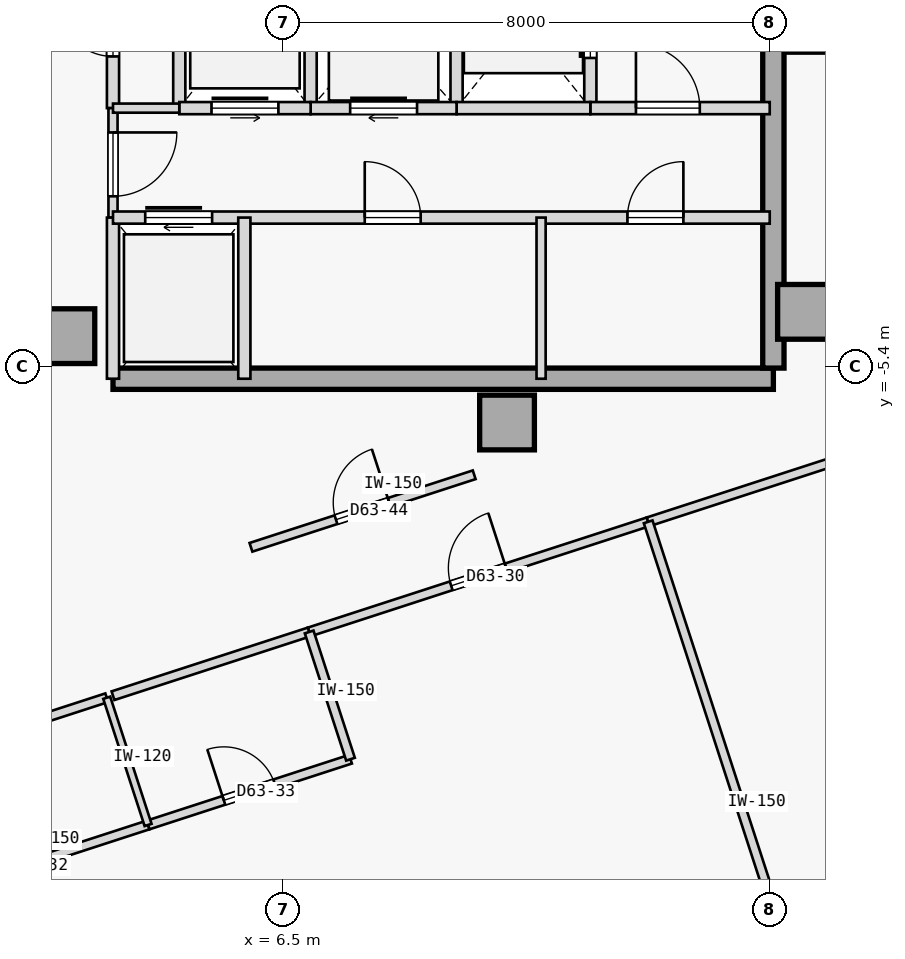
"""IFC4 building model, lengths in metres.
Left out: names, types, materials, properties, quantities, classifications, styles, units other than length and angle.
Written with IfcOpenShell. Run it as: python <this file> out.ifc"""

import sys

from ifc_helpers import new_model, si_unit, direction, frame, frame_2d, origin, origin_2d, place, context, subcontext, project, spatial, rectangle, extrude, element, fill, save


model = new_model("IFC4")
c1 = context("Model", 3, precision=1e-05, world=origin(), true_north=direction((0.0, 1.0)))
c2 = subcontext(c1, "Body", "Model", "MODEL_VIEW")
j1 = project(units=[si_unit("LENGTHUNIT", "METRE"), si_unit("PLANEANGLEUNIT", "RADIAN")], contexts=[c1])
p1 = place(None, origin())
s1 = spatial("IfcSite", under=j1, at=p1, CompositionType="ELEMENT")
p2 = place(p1, origin())
s2 = spatial("IfcBuilding", under=s1, at=p2, CompositionType="ELEMENT")
p3 = place(p2, frame((0.0, 0.0, 237.7)))
s3 = spatial("IfcBuildingStorey", under=s2, at=p3, CompositionType="ELEMENT", Elevation=237.7)
for number, where, z_axis, x_axis in (
    (1, (15.08, -4.5, 0.0), (0.0, 0.0, 1.0), (1.0, 0.0, 0.0)),
    (2, (10.18, -6.32, 0.0), (0.0, 0.0, 1.0), (1.0, 0.0, 0.0)),
    (3, (2.95, -4.9, 0.0), (0.0, 0.0, 1.0), (1.0, 0.0, 0.0)),
):
    element("IfcColumn", number, at=place(p3, frame(where, z_axis=z_axis, x_axis=x_axis)), inside=s3, PredefinedType="COLUMN", context=c2, shape_type="SweptSolid", body=[
        extrude(rectangle(XDim=0.9, YDim=0.9, at=origin_2d()), origin(), (0.0, 0.0, 1.0), 3.35),
    ])
p4 = place(p3, frame((3.7, -5.6, 0.0), z_axis=(0.0, 0.0, 1.0), x_axis=(1.0, 0.0, 0.0)))
e4 = element("IfcWall", 4, at=p4, inside=s3, PredefinedType="SHEAR", context=c2, shape_type="SweptSolid", body=[
    extrude(rectangle(XDim=10.86, YDim=0.35, at=frame_2d((5.43, 0.0))), origin(), (0.0, 0.0, 1.0), 3.125),
])
p5 = place(p3, frame((14.56, -5.425, 0.0), z_axis=(0.0, 0.0, 1.0), x_axis=(0.0, 1.0, 0.0)))
e5 = element("IfcWall", 5, at=p5, inside=s3, PredefinedType="SHEAR", context=c2, shape_type="SweptSolid", body=[
    extrude(rectangle(XDim=10.85, YDim=0.35, at=frame_2d((5.425, 0.0))), origin(), (0.0, 0.0, 1.0), 3.125),
])
p6 = place(p3, frame((3.7, -1.15, 0.0), z_axis=(0.0, 0.0, 1.0), x_axis=(0.0, 1.0, 0.0)))
e6 = element("IfcWall", 6, at=p6, inside=s3, PredefinedType="STANDARD", context=c2, shape_type="SweptSolid", body=[
    extrude(rectangle(XDim=6.75, YDim=0.2, at=frame_2d((3.375, 0.0))), origin(), (0.0, 0.0, 1.0), 3.125),
])
p7 = place(p6, frame((3.6, 0.0, 0.0)))
e7 = element("IfcOpeningElement", 7, at=p7, cuts=e6, PredefinedType="OPENING", context=c2, shape_type="SweptSolid", body=[
    extrude(rectangle(XDim=0.92, YDim=2.15, at=frame_2d((0.46, 1.075))), frame((0.0, 0.11, 0.0), z_axis=(0.0, -1.0, 0.0), x_axis=(1.0, 0.0, 0.0)), (0.0, 0.0, 1.0), 0.22),
])
p8 = place(p6, frame((0.85, 0.0, 0.0)))
e8 = element("IfcOpeningElement", 8, at=p8, cuts=e6, PredefinedType="OPENING", context=c2, shape_type="SweptSolid", body=[
    extrude(rectangle(XDim=0.9, YDim=2.15, at=frame_2d((0.45, 1.075))), frame((0.0, 0.11, 0.0), z_axis=(0.0, -1.0, 0.0), x_axis=(1.0, 0.0, 0.0)), (0.0, 0.0, 1.0), 0.22),
])
p9 = place(p3, frame((3.7, -2.95, 0.0), z_axis=(0.0, 0.0, 1.0), x_axis=(0.0, 1.0, 0.0)))
e9 = element("IfcWall", 9, at=p9, inside=s3, PredefinedType="PARTITIONING", context=c2, shape_type="SweptSolid", body=[
    extrude(rectangle(XDim=1.8, YDim=0.15, at=frame_2d((0.9, 0.0))), origin(), (0.0, 0.0, 1.0), 3.125),
])
p10 = place(p9, frame((0.35, 0.0, 0.0)))
e10 = element("IfcOpeningElement", 10, at=p10, cuts=e9, PredefinedType="OPENING", context=c2, shape_type="SweptSolid", body=[
    extrude(rectangle(XDim=1.05, YDim=2.18, at=frame_2d((0.525, 1.09))), frame((0.0, 0.085, 0.0), z_axis=(0.0, -1.0, 0.0), x_axis=(1.0, 0.0, 0.0)), (0.0, 0.0, 1.0), 0.17),
])
p11 = place(p3, frame((3.7, -5.6, 0.0), z_axis=(0.0, 0.0, 1.0), x_axis=(0.0, 1.0, 0.0)))
e11 = element("IfcWall", 11, at=p11, inside=s3, PredefinedType="STANDARD", context=c2, shape_type="SweptSolid", body=[
    extrude(rectangle(XDim=2.65, YDim=0.2, at=frame_2d((1.325, 0.0))), origin(), (0.0, 0.0, 1.0), 3.125),
])
p12 = place(p3, frame((11.55, -1.15, 0.0), z_axis=(0.0, 0.0, 1.0), x_axis=(0.0, 1.0, 0.0)))
e12 = element("IfcWall", 12, at=p12, inside=s3, PredefinedType="STANDARD", context=c2, shape_type="SweptSolid", body=[
    extrude(rectangle(XDim=2.75, YDim=0.2, at=frame_2d((1.375, 0.0))), origin(), (0.0, 0.0, 1.0), 3.125),
])
p13 = place(p12, frame((0.825, 0.0, 0.0)))
e13 = element("IfcOpeningElement", 13, at=p13, cuts=e12, PredefinedType="OPENING", context=c2, shape_type="SweptSolid", body=[
    extrude(rectangle(XDim=1.1, YDim=2.15, at=frame_2d((0.55, 1.075))), frame((0.0, 0.11, 0.0), z_axis=(0.0, -1.0, 0.0), x_axis=(1.0, 0.0, 0.0)), (0.0, 0.0, 1.0), 0.22),
])
p14 = place(p3, frame((9.35, -1.15, 0.0), z_axis=(0.0, 0.0, 1.0), x_axis=(0.0, 1.0, 0.0)))
e14 = element("IfcWall", 14, at=p14, inside=s3, PredefinedType="STANDARD", context=c2, shape_type="SweptSolid", body=[
    extrude(rectangle(XDim=2.75, YDim=0.2, at=frame_2d((1.375, 0.0))), origin(), (0.0, 0.0, 1.0), 3.125),
])
p15 = place(p3, frame((11.55, -1.15, 0.0), z_axis=(0.0, 0.0, 1.0), x_axis=(1.0, 0.0, 0.0)))
e15 = element("IfcWall", 15, at=p15, inside=s3, PredefinedType="STANDARD", context=c2, shape_type="SweptSolid", body=[
    extrude(rectangle(XDim=2.95, YDim=0.2, at=frame_2d((1.475, 0.0))), origin(), (0.0, 0.0, 1.0), 3.125),
])
p16 = place(p15, frame((0.75, 0.0, 0.0)))
e16 = element("IfcOpeningElement", 16, at=p16, cuts=e15, PredefinedType="OPENING", context=c2, shape_type="SweptSolid", body=[
    extrude(rectangle(XDim=1.05, YDim=2.18, at=frame_2d((0.525, 1.09))), frame((0.0, 0.11, 0.0), z_axis=(0.0, -1.0, 0.0), x_axis=(1.0, 0.0, 0.0)), (0.0, 0.0, 1.0), 0.22),
])
p17 = place(p3, frame((9.35, -1.15, 0.0), z_axis=(0.0, 0.0, 1.0), x_axis=(1.0, 0.0, 0.0)))
e17 = element("IfcWall", 17, at=p17, inside=s3, PredefinedType="STANDARD", context=c2, shape_type="SweptSolid", body=[
    extrude(rectangle(XDim=2.2, YDim=0.2, at=frame_2d((1.1, 0.0))), origin(), (0.0, 0.0, 1.0), 3.125),
])
p18 = place(p3, frame((6.95, -1.15, 0.0), z_axis=(0.0, 0.0, 1.0), x_axis=(0.0, 1.0, 0.0)))
e18 = element("IfcWall", 18, at=p18, inside=s3, PredefinedType="STANDARD", context=c2, shape_type="SweptSolid", body=[
    extrude(rectangle(XDim=2.75, YDim=0.2, at=frame_2d((1.375, 0.0))), origin(), (0.0, 0.0, 1.0), 3.125),
])
p19 = place(p3, frame((6.95, -1.15, 0.0), z_axis=(0.0, 0.0, 1.0), x_axis=(1.0, 0.0, 0.0)))
e19 = element("IfcWall", 19, at=p19, inside=s3, PredefinedType="STANDARD", context=c2, shape_type="SweptSolid", body=[
    extrude(rectangle(XDim=2.4, YDim=0.2, at=frame_2d((1.2, 0.0))), origin(), (0.0, 0.0, 1.0), 3.125),
])
p20 = place(p19, frame((0.65, 0.0, 0.0)))
e20 = element("IfcOpeningElement", 20, at=p20, cuts=e19, PredefinedType="OPENING", context=c2, shape_type="SweptSolid", body=[
    extrude(rectangle(XDim=1.1, YDim=2.15, at=frame_2d((0.55, 1.075))), frame((0.0, 0.11, 0.0), z_axis=(0.0, -1.0, 0.0), x_axis=(1.0, 0.0, 0.0)), (0.0, 0.0, 1.0), 0.22),
])
p21 = place(p3, frame((4.79, -1.15, 0.0), z_axis=(0.0, 0.0, 1.0), x_axis=(0.0, 1.0, 0.0)))
e21 = element("IfcWall", 21, at=p21, inside=s3, PredefinedType="STANDARD", context=c2, shape_type="SweptSolid", body=[
    extrude(rectangle(XDim=2.75, YDim=0.2, at=frame_2d((1.375, 0.0))), origin(), (0.0, 0.0, 1.0), 3.125),
])
p22 = place(p3, frame((4.79, -1.15, 0.0), z_axis=(0.0, 0.0, 1.0), x_axis=(1.0, 0.0, 0.0)))
e22 = element("IfcWall", 22, at=p22, inside=s3, PredefinedType="STANDARD", context=c2, shape_type="SweptSolid", body=[
    extrude(rectangle(XDim=2.16, YDim=0.2, at=frame_2d((1.08, 0.0))), origin(), (0.0, 0.0, 1.0), 3.125),
])
p23 = place(p22, frame((0.53, 0.0, 0.0)))
e23 = element("IfcOpeningElement", 23, at=p23, cuts=e22, PredefinedType="OPENING", context=c2, shape_type="SweptSolid", body=[
    extrude(rectangle(XDim=1.1, YDim=2.15, at=frame_2d((0.55, 1.075))), frame((0.0, 0.11, 0.0), z_axis=(0.0, -1.0, 0.0), x_axis=(1.0, 0.0, 0.0)), (0.0, 0.0, 1.0), 0.22),
])
p24 = place(p3, frame((3.7, -1.15, 0.0), z_axis=(0.0, 0.0, 1.0), x_axis=(1.0, 0.0, 0.0)))
e24 = element("IfcWall", 24, at=p24, inside=s3, PredefinedType="PARTITIONING", context=c2, shape_type="SweptSolid", body=[
    extrude(rectangle(XDim=1.09, YDim=0.15, at=frame_2d((0.545, 0.0))), origin(), (0.0, 0.0, 1.0), 3.125),
])
p25 = place(p3, frame((3.7, -2.95, 0.0), z_axis=(0.0, 0.0, 1.0), x_axis=(1.0, 0.0, 0.0)))
e25 = element("IfcWall", 25, at=p25, inside=s3, PredefinedType="STANDARD", context=c2, shape_type="SweptSolid", body=[
    extrude(rectangle(XDim=10.8, YDim=0.2, at=frame_2d((5.4, 0.0))), origin(), (0.0, 0.0, 1.0), 3.125),
])
p26 = place(p25, frame((0.53, 0.0, 0.0)))
e26 = element("IfcOpeningElement", 26, at=p26, cuts=e25, PredefinedType="OPENING", context=c2, shape_type="SweptSolid", body=[
    extrude(rectangle(XDim=1.1, YDim=2.15, at=frame_2d((0.55, 1.075))), frame((0.0, 0.11, 0.0), z_axis=(0.0, -1.0, 0.0), x_axis=(1.0, 0.0, 0.0)), (0.0, 0.0, 1.0), 0.22),
])
p27 = place(p25, frame((4.14, 0.0, 0.0)))
e27 = element("IfcOpeningElement", 27, at=p27, cuts=e25, PredefinedType="OPENING", context=c2, shape_type="SweptSolid", body=[
    extrude(rectangle(XDim=0.92, YDim=2.15, at=frame_2d((0.46, 1.075))), frame((0.0, 0.11, 0.0), z_axis=(0.0, -1.0, 0.0), x_axis=(1.0, 0.0, 0.0)), (0.0, 0.0, 1.0), 0.22),
])
p28 = place(p25, frame((8.46, 0.0, 0.0)))
e28 = element("IfcOpeningElement", 28, at=p28, cuts=e25, PredefinedType="OPENING", context=c2, shape_type="SweptSolid", body=[
    extrude(rectangle(XDim=0.92, YDim=2.15, at=frame_2d((0.46, 1.075))), frame((0.0, 0.11, 0.0), z_axis=(0.0, -1.0, 0.0), x_axis=(1.0, 0.0, 0.0)), (0.0, 0.0, 1.0), 0.22),
])
p29 = place(p3, frame((5.86, -5.6, 0.0), z_axis=(0.0, 0.0, 1.0), x_axis=(0.0, 1.0, 0.0)))
e29 = element("IfcWall", 29, at=p29, inside=s3, PredefinedType="STANDARD", context=c2, shape_type="SweptSolid", body=[
    extrude(rectangle(XDim=2.65, YDim=0.2, at=frame_2d((1.325, 0.0))), origin(), (0.0, 0.0, 1.0), 3.125),
])
p30 = place(p3, frame((10.74, -5.6, 0.0), z_axis=(0.0, 0.0, 1.0), x_axis=(0.0, 1.0, 0.0)))
e30 = element("IfcWall", 30, at=p30, inside=s3, PredefinedType="PARTITIONING", context=c2, shape_type="SweptSolid", body=[
    extrude(rectangle(XDim=2.65, YDim=0.15, at=frame_2d((1.325, 0.0))), origin(), (0.0, 0.0, 1.0), 3.125),
])
p31 = place(p3, frame((6.926, -9.765, 0.0), z_axis=(0.0, 0.0, 1.0), x_axis=(0.951054878391, 0.30902203528, 0.0)))
e31 = element("IfcWall", 31, at=p31, inside=s3, PredefinedType="PARTITIONING", context=c2, shape_type="SweptSolid", body=[
    extrude(rectangle(XDim=5.862, YDim=0.15, at=frame_2d((2.931, 0.0))), origin(), (0.0, 0.0, 1.0), 3.125),
])
p32 = place(p31, frame((2.456, 0.0, 0.0)))
e32 = element("IfcOpeningElement", 32, at=p32, cuts=e31, PredefinedType="OPENING", context=c2, shape_type="SweptSolid", body=[
    extrude(rectangle(XDim=0.95, YDim=2.15, at=frame_2d((0.475, 1.075))), frame((0.0, 0.085, 0.0), z_axis=(0.0, -1.0, 0.0), x_axis=(1.0, 0.0, 0.0)), (0.0, 0.0, 1.0), 0.17),
])
p33 = place(p3, frame((-0.54, -12.19, 0.0), z_axis=(0.0, 0.0, 1.0), x_axis=(0.951057987102, 0.309012467661, 0.0)))
e33 = element("IfcWall", 33, at=p33, inside=s3, PredefinedType="PARTITIONING", context=c2, shape_type="SweptSolid", body=[
    extrude(rectangle(XDim=4.35, YDim=0.15, at=frame_2d((2.175, 0.0))), origin(), (0.0, 0.0, 1.0), 3.125),
])
p34 = place(p3, frame((3.7, -10.813, 0.0), z_axis=(0.0, 0.0, 1.0), x_axis=(0.95106685659, 0.308985168408, 0.0)))
e34 = element("IfcWall", 34, at=p34, inside=s3, PredefinedType="PARTITIONING", context=c2, shape_type="SweptSolid", body=[
    extrude(rectangle(XDim=3.392, YDim=0.15, at=frame_2d((1.696, 0.0))), origin(), (0.0, 0.0, 1.0), 3.125),
])
p35 = place(p3, frame((12.501, -7.953, 0.0), z_axis=(0.0, 0.0, 1.0), x_axis=(0.951046103464, 0.309049039936, 0.0)))
e35 = element("IfcWall", 35, at=p35, inside=s3, PredefinedType="PARTITIONING", context=c2, shape_type="SweptSolid", body=[
    extrude(rectangle(XDim=4.025, YDim=0.15, at=frame_2d((2.012, 0.0))), origin(), (0.0, 0.0, 1.0), 3.125),
])
p36 = place(p3, frame((5.969, -8.372, 0.0), z_axis=(0.0, 0.0, 1.0), x_axis=(0.951053123415, 0.309027436391, 0.0)))
e36 = element("IfcWall", 36, at=p36, inside=s3, PredefinedType="PARTITIONING", context=c2, shape_type="SweptSolid", body=[
    extrude(rectangle(XDim=3.86, YDim=0.15, at=frame_2d((1.93, 0.0))), origin(), (0.0, 0.0, 1.0), 3.125),
])
p37 = place(p36, frame((1.47, 0.0, 0.0)))
e37 = element("IfcOpeningElement", 37, at=p37, cuts=e36, PredefinedType="OPENING", context=c2, shape_type="SweptSolid", body=[
    extrude(rectangle(XDim=0.92, YDim=2.15, at=frame_2d((0.46, 1.075))), frame((0.0, 0.085, 0.0), z_axis=(0.0, -1.0, 0.0), x_axis=(1.0, 0.0, 0.0)), (0.0, 0.0, 1.0), 0.17),
])
p38 = place(p3, frame((0.14, -14.283, 0.0), z_axis=(0.0, 0.0, 1.0), x_axis=(0.951057987102, 0.309012467661, 0.0)))
e38 = element("IfcWall", 38, at=p38, inside=s3, PredefinedType="PARTITIONING", context=c2, shape_type="SweptSolid", body=[
    extrude(rectangle(XDim=4.35, YDim=0.15, at=frame_2d((2.175, 0.0))), origin(), (0.0, 0.0, 1.0), 3.125),
])
p39 = place(p38, frame((1.725, 0.0, 0.0)))
e39 = element("IfcOpeningElement", 39, at=p39, cuts=e38, PredefinedType="OPENING", context=c2, shape_type="SweptSolid", body=[
    extrude(rectangle(XDim=0.9, YDim=2.15, at=frame_2d((0.45, 1.075))), frame((0.0, 0.085, 0.0), z_axis=(0.0, -1.0, 0.0), x_axis=(1.0, 0.0, 0.0)), (0.0, 0.0, 1.0), 0.17),
])
p40 = place(p3, frame((4.277, -12.938, 0.0), z_axis=(0.0, 0.0, 1.0), x_axis=(0.951055596592, 0.309019824916, 0.0)))
e40 = element("IfcWall", 40, at=p40, inside=s3, PredefinedType="PARTITIONING", context=c2, shape_type="SweptSolid", body=[
    extrude(rectangle(XDim=3.5, YDim=0.15, at=frame_2d((1.75, 0.0))), origin(), (0.0, 0.0, 1.0), 3.125),
])
p41 = place(p40, frame((1.31, 0.0, 0.0)))
e41 = element("IfcOpeningElement", 41, at=p41, cuts=e40, PredefinedType="OPENING", context=c2, shape_type="SweptSolid", body=[
    extrude(rectangle(XDim=0.88, YDim=2.15, at=frame_2d((0.44, 1.075))), frame((0.0, 0.085, 0.0), z_axis=(0.0, -1.0, 0.0), x_axis=(1.0, 0.0, 0.0)), (0.0, 0.0, 1.0), 0.17),
])
p42 = place(p3, frame((7.606, -11.857, 0.0), z_axis=(0.0, 0.0, 1.0), x_axis=(-0.309060979314, 0.951042223598, 0.0)))
e42 = element("IfcWall", 42, at=p42, inside=s3, PredefinedType="PARTITIONING", context=c2, shape_type="SweptSolid", body=[
    extrude(rectangle(XDim=2.2, YDim=0.15, at=frame_2d((1.1, 0.0))), origin(), (0.0, 0.0, 1.0), 3.125),
])
p43 = place(p3, frame((15.548, -17.333, 0.0), z_axis=(0.0, 0.0, 1.0), x_axis=(-0.308999867152, 0.951062081097, 0.0)))
e43 = element("IfcWall", 43, at=p43, inside=s3, PredefinedType="PARTITIONING", context=c2, shape_type="SweptSolid", body=[
    extrude(rectangle(XDim=9.862, YDim=0.15, at=frame_2d((4.931, 0.0))), origin(), (0.0, 0.0, 1.0), 3.125),
])
p44 = place(p3, frame((4.277, -12.938, 0.0), z_axis=(0.0, 0.0, 1.0), x_axis=(-0.309060979314, 0.951042223598, 0.0)))
e44 = element("IfcWall", 44, at=p44, inside=s3, PredefinedType="PARTITIONING", context=c2, shape_type="SweptSolid", body=[
    extrude(rectangle(XDim=2.2, YDim=0.12, at=frame_2d((1.1, 0.0))), origin(), (0.0, 0.0, 1.0), 3.125),
])
p45 = place(p16, origin())
e45 = element("IfcDoor", 45, at=p45, inside=s3, OperationType="SINGLE_SWING_LEFT", PredefinedType="DOOR", context=c2, shape_type="SweptSolid", body=[
    extrude(rectangle(XDim=1.05, YDim=2.18, at=frame_2d((0.525, 1.09))), frame((0.0, 0.025, 0.0), z_axis=(0.0, -1.0, 0.0), x_axis=(1.0, 0.0, 0.0)), (0.0, 0.0, 1.0), 0.05),
])
fill(e16, e45)
p46 = place(p10, frame((1.05, 0.0, 0.0), z_axis=(0.0, 0.0, 1.0), x_axis=(-1.0, 0.0, 0.0)))
e46 = element("IfcDoor", 46, at=p46, inside=s3, OperationType="SINGLE_SWING_RIGHT", PredefinedType="DOOR", context=c2, shape_type="SweptSolid", body=[
    extrude(rectangle(XDim=1.05, YDim=2.18, at=frame_2d((0.525, 1.09))), frame((0.0, 0.025, 0.0), z_axis=(0.0, -1.0, 0.0), x_axis=(1.0, 0.0, 0.0)), (0.0, 0.0, 1.0), 0.05),
])
fill(e10, e46)
p47 = place(p13, origin())
e47 = element("IfcDoor", 47, at=p47, inside=s3, OperationType="SLIDING_TO_RIGHT", PredefinedType="DOOR", context=c2, shape_type="SweptSolid", body=[
    extrude(rectangle(XDim=1.1, YDim=2.15, at=frame_2d((0.55, 1.075))), frame((0.0, 0.025, 0.0), z_axis=(0.0, -1.0, 0.0), x_axis=(1.0, 0.0, 0.0)), (0.0, 0.0, 1.0), 0.05),
])
fill(e13, e47)
p48 = place(p20, origin())
e48 = element("IfcDoor", 48, at=p48, inside=s3, OperationType="SLIDING_TO_RIGHT", PredefinedType="DOOR", context=c2, shape_type="SweptSolid", body=[
    extrude(rectangle(XDim=1.1, YDim=2.15, at=frame_2d((0.55, 1.075))), frame((0.0, 0.025, 0.0), z_axis=(0.0, -1.0, 0.0), x_axis=(1.0, 0.0, 0.0)), (0.0, 0.0, 1.0), 0.05),
])
fill(e20, e48)
p49 = place(p23, origin())
e49 = element("IfcDoor", 49, at=p49, inside=s3, OperationType="SLIDING_TO_LEFT", PredefinedType="DOOR", context=c2, shape_type="SweptSolid", body=[
    extrude(rectangle(XDim=1.1, YDim=2.15, at=frame_2d((0.55, 1.075))), frame((0.0, 0.025, 0.0), z_axis=(0.0, -1.0, 0.0), x_axis=(1.0, 0.0, 0.0)), (0.0, 0.0, 1.0), 0.05),
])
fill(e23, e49)
p50 = place(p26, origin())
e50 = element("IfcDoor", 50, at=p50, inside=s3, OperationType="SLIDING_TO_RIGHT", PredefinedType="DOOR", context=c2, shape_type="SweptSolid", body=[
    extrude(rectangle(XDim=1.1, YDim=2.15, at=frame_2d((0.55, 1.075))), frame((0.0, 0.025, 0.0), z_axis=(0.0, -1.0, 0.0), x_axis=(1.0, 0.0, 0.0)), (0.0, 0.0, 1.0), 0.05),
])
fill(e26, e50)
p51 = place(p27, origin())
e51 = element("IfcDoor", 51, at=p51, inside=s3, OperationType="SINGLE_SWING_LEFT", PredefinedType="DOOR", context=c2, shape_type="SweptSolid", body=[
    extrude(rectangle(XDim=0.92, YDim=2.15, at=frame_2d((0.46, 1.075))), frame((0.0, 0.025, 0.0), z_axis=(0.0, -1.0, 0.0), x_axis=(1.0, 0.0, 0.0)), (0.0, 0.0, 1.0), 0.05),
])
fill(e27, e51)
p52 = place(p28, origin())
e52 = element("IfcDoor", 52, at=p52, inside=s3, OperationType="SINGLE_SWING_RIGHT", PredefinedType="DOOR", context=c2, shape_type="SweptSolid", body=[
    extrude(rectangle(XDim=0.92, YDim=2.15, at=frame_2d((0.46, 1.075))), frame((0.0, 0.025, 0.0), z_axis=(0.0, -1.0, 0.0), x_axis=(1.0, 0.0, 0.0)), (0.0, 0.0, 1.0), 0.05),
])
fill(e28, e52)
p53 = place(p8, origin())
e53 = element("IfcDoor", 53, at=p53, inside=s3, OperationType="SINGLE_SWING_RIGHT", PredefinedType="DOOR", context=c2, shape_type="SweptSolid", body=[
    extrude(rectangle(XDim=0.9, YDim=2.15, at=frame_2d((0.45, 1.075))), frame((0.0, 0.025, 0.0), z_axis=(0.0, -1.0, 0.0), x_axis=(1.0, 0.0, 0.0)), (0.0, 0.0, 1.0), 0.05),
])
fill(e8, e53)
p54 = place(p32, origin())
e54 = element("IfcDoor", 54, at=p54, inside=s3, OperationType="SINGLE_SWING_RIGHT", PredefinedType="DOOR", context=c2, shape_type="SweptSolid", body=[
    extrude(rectangle(XDim=0.95, YDim=2.15, at=frame_2d((0.475, 1.075))), frame((0.0, 0.025, 0.0), z_axis=(0.0, -1.0, 0.0), x_axis=(1.0, 0.0, 0.0)), (0.0, 0.0, 1.0), 0.05),
])
fill(e32, e54)
p55 = place(p41, origin())
e55 = element("IfcDoor", 55, at=p55, inside=s3, OperationType="SINGLE_SWING_LEFT", PredefinedType="DOOR", context=c2, shape_type="SweptSolid", body=[
    extrude(rectangle(XDim=0.88, YDim=2.15, at=frame_2d((0.44, 1.075))), frame((0.0, 0.025, 0.0), z_axis=(0.0, -1.0, 0.0), x_axis=(1.0, 0.0, 0.0)), (0.0, 0.0, 1.0), 0.05),
])
fill(e41, e55)
p56 = place(p37, origin())
e56 = element("IfcDoor", 56, at=p56, inside=s3, OperationType="SINGLE_SWING_RIGHT", PredefinedType="DOOR", context=c2, shape_type="SweptSolid", body=[
    extrude(rectangle(XDim=0.92, YDim=2.15, at=frame_2d((0.46, 1.075))), frame((0.0, 0.025, 0.0), z_axis=(0.0, -1.0, 0.0), x_axis=(1.0, 0.0, 0.0)), (0.0, 0.0, 1.0), 0.05),
])
fill(e37, e56)
save(model, sys.argv[1])
